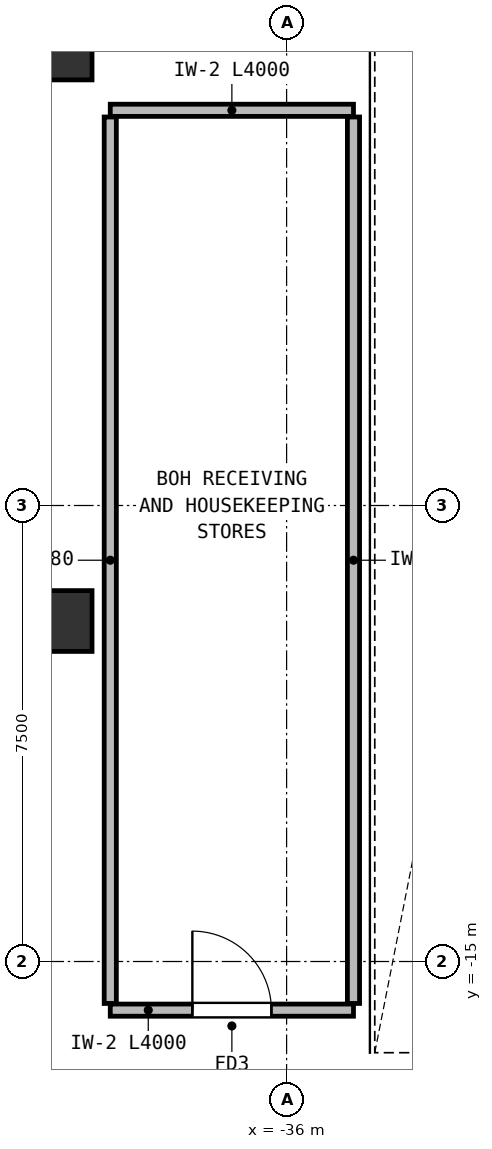
"""IFC4 building model, lengths in metres.
Left out: names, types, materials, properties, quantities, classifications, styles, units other than length and angle.
Written with IfcOpenShell. Run it as: python <this file> out.ifc"""

import sys

from ifc_helpers import new_model, si_unit, direction, frame, frame_2d, origin, origin_2d, place, context, subcontext, project, spatial, rectangle, extrude, element, fill, save


model = new_model("IFC4")
c1 = context("Model", 3, precision=1e-05, world=origin(), true_north=direction((0.0, 1.0)))
c2 = subcontext(c1, "Body", "Model", "MODEL_VIEW")
j1 = project(units=[si_unit("LENGTHUNIT", "METRE"), si_unit("PLANEANGLEUNIT", "RADIAN")], contexts=[c1])
p1 = place(None, origin())
s1 = spatial("IfcSite", under=j1, at=p1, CompositionType="ELEMENT")
p2 = place(p1, origin())
s2 = spatial("IfcBuilding", under=s1, at=p2, CompositionType="ELEMENT")
p3 = place(p2, frame((0.0, 0.0, -4.5)))
s3 = spatial("IfcBuildingStorey", under=s2, at=p3, CompositionType="ELEMENT", Elevation=-4.5)
for number, where, z_axis, x_axis in (
    (1, (-39.6, -9.4, 0.0), (0.0, 0.0, 1.0), (1.0, 0.0, 0.0)),
    (2, (-39.6, 0.0, 0.0), (0.0, 0.0, 1.0), (1.0, 0.0, 0.0)),
):
    element("IfcColumn", number, at=place(p3, frame(where, z_axis=z_axis, x_axis=x_axis)), inside=s3, PredefinedType="COLUMN", context=c2, shape_type="SweptSolid", body=[
        extrude(rectangle(XDim=0.8, YDim=1.0, at=origin_2d()), origin(), (0.0, 0.0, 1.0), 4.5),
    ])
p4 = place(p3, frame((-38.9, -1.0, 0.0), z_axis=(0.0, 0.0, 1.0), x_axis=(1.0, 0.0, 0.0)))
e3 = element("IfcWall", 3, at=p4, inside=s3, PredefinedType="PARTITIONING", context=c2, shape_type="SweptSolid", body=[
    extrude(rectangle(XDim=4.0, YDim=0.2, at=frame_2d((2.0, 0.0))), origin(), (0.0, 0.0, 1.0), 4.22),
])
p5 = place(p3, frame((-38.9, -15.8, 0.0), z_axis=(0.0, 0.0, 1.0), x_axis=(1.0, 0.0, 0.0)))
e4 = element("IfcWall", 4, at=p5, inside=s3, PredefinedType="PARTITIONING", context=c2, shape_type="SweptSolid", body=[
    extrude(rectangle(XDim=4.0, YDim=0.2, at=frame_2d((2.0, 0.0))), origin(), (0.0, 0.0, 1.0), 4.22),
])
p6 = place(p5, frame((1.35, 0.0, 0.0)))
e5 = element("IfcOpeningElement", 5, at=p6, cuts=e4, PredefinedType="OPENING", context=c2, shape_type="SweptSolid", body=[
    extrude(rectangle(XDim=1.3, YDim=2.15, at=frame_2d((0.65, 1.075))), frame((0.0, 0.11, 0.0), z_axis=(0.0, -1.0, 0.0), x_axis=(1.0, 0.0, 0.0)), (0.0, 0.0, 1.0), 0.22),
])
for number, where, z_axis, x_axis in (
    (6, (-38.9, -1.11, 0.0), (0.0, 0.0, 1.0), (0.0, -1.0, 0.0)),
    (7, (-34.9, -15.69, 0.0), (0.0, 0.0, 1.0), (0.0, 1.0, 0.0)),
):
    element("IfcWall", number, at=place(p3, frame(where, z_axis=z_axis, x_axis=x_axis)), inside=s3, PredefinedType="PARTITIONING", context=c2, shape_type="SweptSolid", body=[
        extrude(rectangle(XDim=14.58, YDim=0.2, at=frame_2d((7.29, 0.0))), origin(), (0.0, 0.0, 1.0), 4.22),
    ])
p7 = place(p6, origin())
e8 = element("IfcDoor", 8, at=p7, inside=s3, OperationType="SINGLE_SWING_LEFT", PredefinedType="DOOR", context=c2, shape_type="SweptSolid", body=[
    extrude(rectangle(XDim=1.3, YDim=2.15, at=frame_2d((0.65, 1.075))), frame((0.0, 0.025, 0.0), z_axis=(0.0, -1.0, 0.0), x_axis=(1.0, 0.0, 0.0)), (0.0, 0.0, 1.0), 0.05),
])
fill(e5, e8)
save(model, sys.argv[1])
